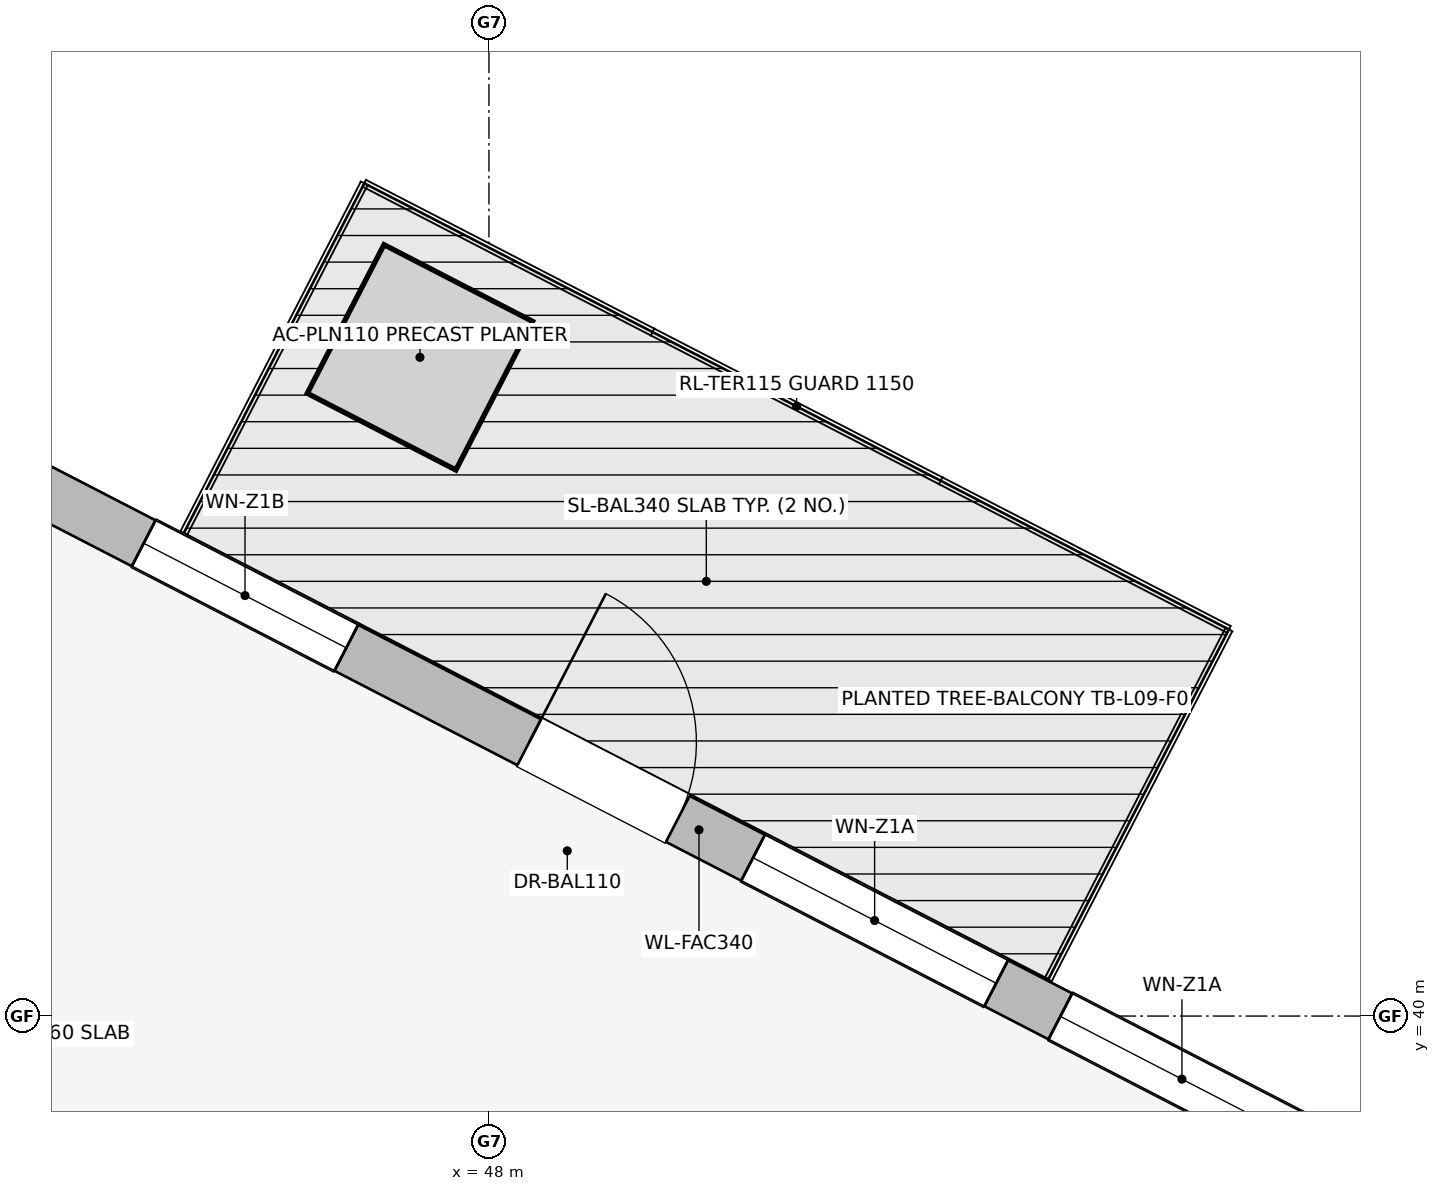
"""IFC4 building model, lengths in metres.
Left out: names, types, materials, properties, quantities, classifications, styles, units other than length and angle.
Written with IfcOpenShell. Run it as: python <this file> out.ifc"""

import sys

from ifc_helpers import new_model, si_unit, direction, frame, frame_2d, origin, place, context, subcontext, project, spatial, rectangle, extrude, element, fill, save


model = new_model("IFC4")
c1 = context("Model", 3, precision=1e-05, world=origin(), true_north=direction((0.0, 1.0)))
c2 = subcontext(c1, "Body", "Model", "MODEL_VIEW")
j1 = project(units=[si_unit("LENGTHUNIT", "METRE"), si_unit("PLANEANGLEUNIT", "RADIAN")], contexts=[c1])
p1 = place(None, origin())
s1 = spatial("IfcSite", under=j1, at=p1, CompositionType="ELEMENT")
p2 = place(p1, origin())
s2 = spatial("IfcBuilding", under=s1, at=p2, CompositionType="ELEMENT")
p3 = place(p2, frame((0.0, 0.0, 37.95)))
s3 = spatial("IfcBuildingStorey", under=s2, at=p3, CompositionType="ELEMENT", Elevation=37.95)
p4 = place(p3, frame((39.631, 46.257, 0.0), z_axis=(0.0, 0.0, 1.0), x_axis=(0.888634413993, -0.458616264721, 0.0)))
e1 = element("IfcWall", 1, at=p4, inside=s3, PredefinedType="STANDARD", context=c2, shape_type="SweptSolid", body=[
    extrude(rectangle(XDim=20.531, YDim=0.34, at=frame_2d((10.266, 0.0))), origin(), (0.0, 0.0, 1.0), 2.684),
])
p5 = place(p4, frame((9.716, 0.0, 0.0)))
e2 = element("IfcOpeningElement", 2, at=p5, cuts=e1, PredefinedType="OPENING", context=c2, shape_type="SweptSolid", body=[
    extrude(rectangle(XDim=1.1, YDim=2.04, at=frame_2d((0.55, 1.02))), frame((0.0, 0.18, 0.0), z_axis=(0.0, -1.0, 0.0), x_axis=(1.0, 0.0, 0.0)), (0.0, 0.0, 1.0), 0.36),
])
p6 = place(p4, frame((1.058, 0.0, 0.75)))
e3 = element("IfcOpeningElement", 3, at=p6, cuts=e1, PredefinedType="OPENING", context=c2, shape_type="SweptSolid", body=[
    extrude(rectangle(XDim=1.8, YDim=1.5, at=frame_2d((0.9, 0.75))), frame((0.0, 0.18, 0.0), z_axis=(0.0, -1.0, 0.0), x_axis=(1.0, 0.0, 0.0)), (0.0, 0.0, 1.0), 0.36),
])
p7 = place(p4, frame((6.862, 0.0, 0.75)))
e4 = element("IfcOpeningElement", 4, at=p7, cuts=e1, PredefinedType="OPENING", context=c2, shape_type="SweptSolid", body=[
    extrude(rectangle(XDim=1.5, YDim=1.5, at=frame_2d((0.75, 0.75))), frame((0.0, 0.18, 0.0), z_axis=(0.0, -1.0, 0.0), x_axis=(1.0, 0.0, 0.0)), (0.0, 0.0, 1.0), 0.36),
])
p8 = place(p4, frame((11.373, 0.0, 0.75)))
e5 = element("IfcOpeningElement", 5, at=p8, cuts=e1, PredefinedType="OPENING", context=c2, shape_type="SweptSolid", body=[
    extrude(rectangle(XDim=1.8, YDim=1.5, at=frame_2d((0.9, 0.75))), frame((0.0, 0.18, 0.0), z_axis=(0.0, -1.0, 0.0), x_axis=(1.0, 0.0, 0.0)), (0.0, 0.0, 1.0), 0.36),
])
p9 = place(p4, frame((13.648, 0.0, 0.75)))
e6 = element("IfcOpeningElement", 6, at=p9, cuts=e1, PredefinedType="OPENING", context=c2, shape_type="SweptSolid", body=[
    extrude(rectangle(XDim=1.8, YDim=1.5, at=frame_2d((0.9, 0.75))), frame((0.0, 0.18, 0.0), z_axis=(0.0, -1.0, 0.0), x_axis=(1.0, 0.0, 0.0)), (0.0, 0.0, 1.0), 0.36),
])
p10 = place(p4, frame((17.823, 0.0, 0.75)))
e7 = element("IfcOpeningElement", 7, at=p10, cuts=e1, PredefinedType="OPENING", context=c2, shape_type="SweptSolid", body=[
    extrude(rectangle(XDim=1.5, YDim=1.5, at=frame_2d((0.75, 0.75))), frame((0.0, 0.18, 0.0), z_axis=(0.0, -1.0, 0.0), x_axis=(1.0, 0.0, 0.0)), (0.0, 0.0, 1.0), 0.36),
])
p11 = place(p5, origin())
e8 = element("IfcDoor", 8, at=p11, inside=s3, OperationType="SINGLE_SWING_LEFT", PredefinedType="DOOR", context=c2, shape_type="SweptSolid", body=[
    extrude(rectangle(XDim=1.1, YDim=2.04, at=frame_2d((0.55, 1.02))), frame((0.0, 0.025, 0.0), z_axis=(0.0, -1.0, 0.0), x_axis=(1.0, 0.0, 0.0)), (0.0, 0.0, 1.0), 0.05),
])
fill(e2, e8)
p12 = place(p7, origin())
e9 = element("IfcWindow", 9, at=p12, inside=s3, PartitioningType="SINGLE_PANEL", PredefinedType="WINDOW", context=c2, shape_type="SweptSolid", body=[
    extrude(rectangle(XDim=1.5, YDim=1.5, at=frame_2d((0.75, 0.75))), frame((0.0, 0.03, 0.0), z_axis=(0.0, -1.0, 0.0), x_axis=(1.0, 0.0, 0.0)), (0.0, 0.0, 1.0), 0.06),
])
fill(e4, e9)
p13 = place(p8, origin())
e10 = element("IfcWindow", 10, at=p13, inside=s3, PartitioningType="SINGLE_PANEL", PredefinedType="WINDOW", context=c2, shape_type="SweptSolid", body=[
    extrude(rectangle(XDim=1.8, YDim=1.5, at=frame_2d((0.9, 0.75))), frame((0.0, 0.03, 0.0), z_axis=(0.0, -1.0, 0.0), x_axis=(1.0, 0.0, 0.0)), (0.0, 0.0, 1.0), 0.06),
])
fill(e5, e10)
p14 = place(p9, origin())
e11 = element("IfcWindow", 11, at=p14, inside=s3, PartitioningType="SINGLE_PANEL", PredefinedType="WINDOW", context=c2, shape_type="SweptSolid", body=[
    extrude(rectangle(XDim=1.8, YDim=1.5, at=frame_2d((0.9, 0.75))), frame((0.0, 0.03, 0.0), z_axis=(0.0, -1.0, 0.0), x_axis=(1.0, 0.0, 0.0)), (0.0, 0.0, 1.0), 0.06),
])
fill(e6, e11)
save(model, sys.argv[1])
